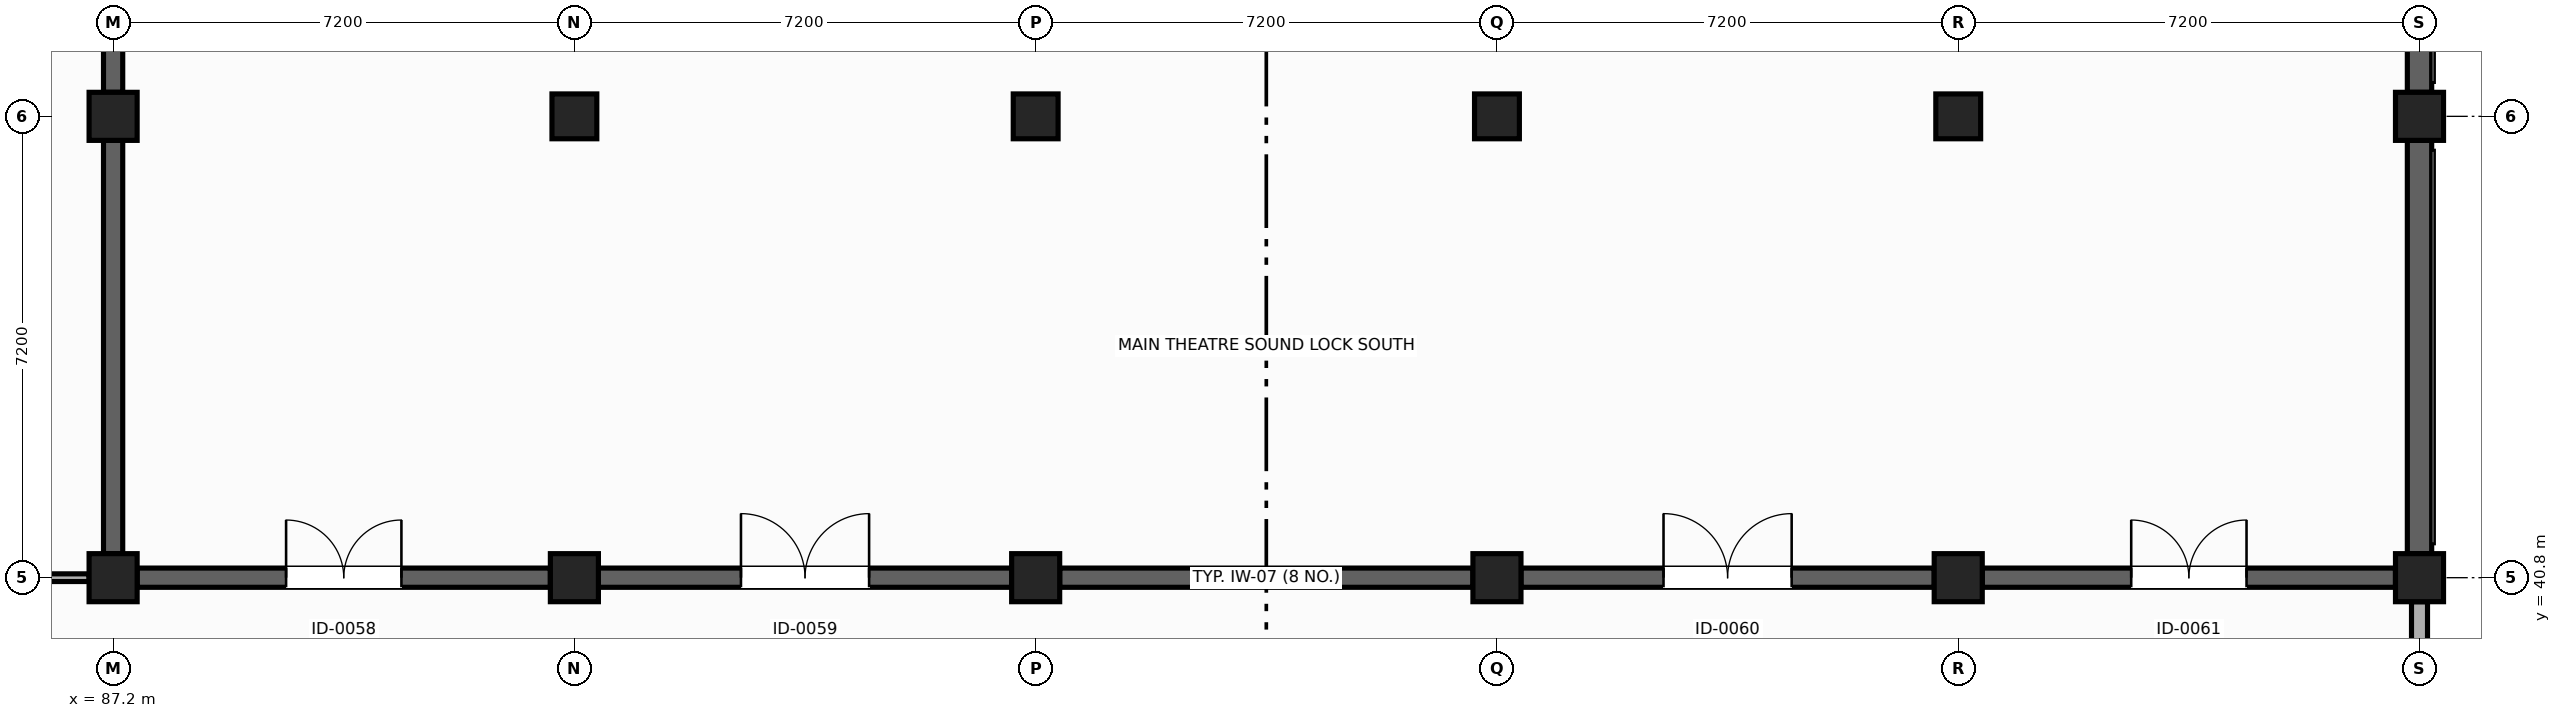
"""IFC4 building model, lengths in metres.
Left out: names, types, materials, properties, quantities, classifications, styles, units other than length and angle.
Written with IfcOpenShell. Run it as: python <this file> out.ifc"""

import sys

from ifc_helpers import new_model, si_unit, direction, frame, frame_2d, origin, origin_2d, place, context, subcontext, project, spatial, rectangle, extrude, element, fill, save


model = new_model("IFC4")
c1 = context("Model", 3, precision=1e-05, world=origin(), true_north=direction((0.0, 1.0)))
c2 = subcontext(c1, "Body", "Model", "MODEL_VIEW")
j1 = project(units=[si_unit("LENGTHUNIT", "METRE"), si_unit("PLANEANGLEUNIT", "RADIAN")], contexts=[c1])
p1 = place(None, origin())
s1 = spatial("IfcSite", under=j1, at=p1, CompositionType="ELEMENT")
p2 = place(p1, origin())
s2 = spatial("IfcBuilding", under=s1, at=p2, CompositionType="ELEMENT")
p3 = place(p2, origin())
s3 = spatial("IfcBuildingStorey", under=s2, at=p3, CompositionType="ELEMENT", Elevation=0.0)
for number, where, z_axis, x_axis in (
    (1, (87.2, 40.8, 0.0), (0.0, 0.0, 1.0), (1.0, 0.0, 0.0)),
    (2, (94.4, 40.8, 0.0), (0.0, 0.0, 1.0), (0.0, 1.0, 0.0)),
    (3, (101.6, 40.8, 0.0), (0.0, 0.0, 1.0), (1.0, 0.0, 0.0)),
    (4, (108.8, 40.8, 0.0), (0.0, 0.0, 1.0), (0.0, 1.0, 0.0)),
    (5, (116.0, 40.8, 0.0), (0.0, 0.0, 1.0), (1.0, 0.0, 0.0)),
    (6, (123.2, 40.8, 0.0), (0.0, 0.0, 1.0), (1.0, 0.0, 0.0)),
    (7, (87.2, 48.0, 0.0), (0.0, 0.0, 1.0), (0.0, 1.0, 0.0)),
):
    element("IfcColumn", number, at=place(p3, frame(where, z_axis=z_axis, x_axis=x_axis)), inside=s3, PredefinedType="COLUMN", context=c2, shape_type="SweptSolid", body=[
        extrude(rectangle(XDim=0.75, YDim=0.75, at=origin_2d()), origin(), (0.0, 0.0, 1.0), 5.4),
    ])
for number, where, z_axis, x_axis in (
    (8, (94.4, 48.0, 0.0), (0.0, 0.0, 1.0), (1.0, 0.0, 0.0)),
    (9, (101.6, 48.0, 0.0), (0.0, 0.0, 1.0), (0.0, 1.0, 0.0)),
    (10, (108.8, 48.0, 0.0), (0.0, 0.0, 1.0), (1.0, 0.0, 0.0)),
    (11, (116.0, 48.0, 0.0), (0.0, 0.0, 1.0), (1.0, 0.0, 0.0)),
):
    element("IfcColumn", number, at=place(p3, frame(where, z_axis=z_axis, x_axis=x_axis)), inside=s3, PredefinedType="COLUMN", context=c2, shape_type="SweptSolid", body=[
        extrude(rectangle(XDim=0.7, YDim=0.7, at=origin_2d()), origin(), (0.0, 0.0, 1.0), 5.4),
    ])
p4 = place(p3, frame((123.2, 48.0, 0.0), z_axis=(0.0, 0.0, 1.0), x_axis=(0.0, 1.0, 0.0)))
e12 = element("IfcColumn", 12, at=p4, inside=s3, PredefinedType="COLUMN", context=c2, shape_type="SweptSolid", body=[
    extrude(rectangle(XDim=0.75, YDim=0.75, at=origin_2d()), origin(), (0.0, 0.0, 1.0), 5.4),
])
p5 = place(p3, frame((123.2, 40.425, 0.0), z_axis=(0.0, 0.0, 1.0), x_axis=(0.0, -1.0, 0.0)))
e13 = element("IfcWall", 13, at=p5, inside=s3, PredefinedType="SOLIDWALL", context=c2, shape_type="SweptSolid", body=[
    extrude(rectangle(XDim=6.475, YDim=0.25, at=frame_2d((3.238, 0.0))), origin(), (0.0, 0.0, 1.0), 4.295),
])
for number, where, z_axis, x_axis in (
    (14, (123.2, 54.825, 0.0), (0.0, 0.0, 1.0), (0.0, -1.0, 0.0)),
    (15, (123.2, 47.625, 0.0), (0.0, 0.0, 1.0), (0.0, -1.0, 0.0)),
):
    element("IfcWall", number, at=place(p3, frame(where, z_axis=z_axis, x_axis=x_axis)), inside=s3, PredefinedType="SHEAR", context=c2, shape_type="SweptSolid", body=[
        extrude(rectangle(XDim=6.45, YDim=0.38, at=frame_2d((3.225, 0.0))), origin(), (0.0, 0.0, 1.0), 5.1),
    ])
p6 = place(p3, frame((87.575, 40.8, 0.0), z_axis=(0.0, 0.0, 1.0), x_axis=(1.0, 0.0, 0.0)))
e16 = element("IfcWall", 16, at=p6, inside=s3, PredefinedType="SHEAR", context=c2, shape_type="SweptSolid", body=[
    extrude(rectangle(XDim=6.45, YDim=0.3, at=frame_2d((3.225, 0.0))), origin(), (0.0, 0.0, 1.0), 5.1),
])
p7 = place(p6, frame((2.325, 0.0, 0.0)))
e17 = element("IfcOpeningElement", 17, at=p7, cuts=e16, PredefinedType="OPENING", context=c2, shape_type="SweptSolid", body=[
    extrude(rectangle(XDim=1.8, YDim=2.3, at=frame_2d((0.9, 1.15))), frame((0.0, 0.16, 0.0), z_axis=(0.0, -1.0, 0.0), x_axis=(1.0, 0.0, 0.0)), (0.0, 0.0, 1.0), 0.32),
])
p8 = place(p3, frame((94.775, 40.8, 0.0), z_axis=(0.0, 0.0, 1.0), x_axis=(1.0, 0.0, 0.0)))
e18 = element("IfcWall", 18, at=p8, inside=s3, PredefinedType="SHEAR", context=c2, shape_type="SweptSolid", body=[
    extrude(rectangle(XDim=6.45, YDim=0.3, at=frame_2d((3.225, 0.0))), origin(), (0.0, 0.0, 1.0), 5.1),
])
p9 = place(p8, frame((2.225, 0.0, 0.0)))
e19 = element("IfcOpeningElement", 19, at=p9, cuts=e18, PredefinedType="OPENING", context=c2, shape_type="SweptSolid", body=[
    extrude(rectangle(XDim=2.0, YDim=2.35, at=frame_2d((1.0, 1.175))), frame((0.0, 0.16, 0.0), z_axis=(0.0, -1.0, 0.0), x_axis=(1.0, 0.0, 0.0)), (0.0, 0.0, 1.0), 0.32),
])
p10 = place(p3, frame((101.975, 40.8, 0.0), z_axis=(0.0, 0.0, 1.0), x_axis=(1.0, 0.0, 0.0)))
e20 = element("IfcWall", 20, at=p10, inside=s3, PredefinedType="SHEAR", context=c2, shape_type="SweptSolid", body=[
    extrude(rectangle(XDim=6.45, YDim=0.3, at=frame_2d((3.225, 0.0))), origin(), (0.0, 0.0, 1.0), 5.1),
])
p11 = place(p3, frame((109.175, 40.8, 0.0), z_axis=(0.0, 0.0, 1.0), x_axis=(1.0, 0.0, 0.0)))
e21 = element("IfcWall", 21, at=p11, inside=s3, PredefinedType="SHEAR", context=c2, shape_type="SweptSolid", body=[
    extrude(rectangle(XDim=6.45, YDim=0.3, at=frame_2d((3.225, 0.0))), origin(), (0.0, 0.0, 1.0), 5.1),
])
p12 = place(p11, frame((2.225, 0.0, 0.0)))
e22 = element("IfcOpeningElement", 22, at=p12, cuts=e21, PredefinedType="OPENING", context=c2, shape_type="SweptSolid", body=[
    extrude(rectangle(XDim=2.0, YDim=2.35, at=frame_2d((1.0, 1.175))), frame((0.0, 0.16, 0.0), z_axis=(0.0, -1.0, 0.0), x_axis=(1.0, 0.0, 0.0)), (0.0, 0.0, 1.0), 0.32),
])
p13 = place(p3, frame((116.375, 40.8, 0.0), z_axis=(0.0, 0.0, 1.0), x_axis=(1.0, 0.0, 0.0)))
e23 = element("IfcWall", 23, at=p13, inside=s3, PredefinedType="SHEAR", context=c2, shape_type="SweptSolid", body=[
    extrude(rectangle(XDim=6.45, YDim=0.3, at=frame_2d((3.225, 0.0))), origin(), (0.0, 0.0, 1.0), 5.1),
])
p14 = place(p13, frame((2.325, 0.0, 0.0)))
e24 = element("IfcOpeningElement", 24, at=p14, cuts=e23, PredefinedType="OPENING", context=c2, shape_type="SweptSolid", body=[
    extrude(rectangle(XDim=1.8, YDim=2.3, at=frame_2d((0.9, 1.15))), frame((0.0, 0.16, 0.0), z_axis=(0.0, -1.0, 0.0), x_axis=(1.0, 0.0, 0.0)), (0.0, 0.0, 1.0), 0.32),
])
p15 = place(p3, frame((87.2, 41.175, 0.0), z_axis=(0.0, 0.0, 1.0), x_axis=(0.0, 1.0, 0.0)))
e25 = element("IfcWall", 25, at=p15, inside=s3, PredefinedType="SHEAR", context=c2, shape_type="SweptSolid", body=[
    extrude(rectangle(XDim=6.45, YDim=0.3, at=frame_2d((3.225, 0.0))), origin(), (0.0, 0.0, 1.0), 5.1),
])
p16 = place(p3, frame((87.2, 48.375, 0.0), z_axis=(0.0, 0.0, 1.0), x_axis=(0.0, 1.0, 0.0)))
e26 = element("IfcWall", 26, at=p16, inside=s3, PredefinedType="SHEAR", context=c2, shape_type="SweptSolid", body=[
    extrude(rectangle(XDim=6.45, YDim=0.3, at=frame_2d((3.225, 0.0))), origin(), (0.0, 0.0, 1.0), 5.1),
])
p17 = place(p16, frame((2.275, 0.0, 0.0)))
e27 = element("IfcOpeningElement", 27, at=p17, cuts=e26, PredefinedType="OPENING", context=c2, shape_type="SweptSolid", body=[
    extrude(rectangle(XDim=1.9, YDim=2.35, at=frame_2d((0.95, 1.175))), frame((0.0, 0.16, 0.0), z_axis=(0.0, -1.0, 0.0), x_axis=(1.0, 0.0, 0.0)), (0.0, 0.0, 1.0), 0.32),
])
p18 = place(p3, frame((80.662, 40.8, 0.0), z_axis=(0.0, 0.0, 1.0), x_axis=(1.0, 0.0, 0.0)))
e28 = element("IfcWall", 28, at=p18, inside=s3, PredefinedType="PARTITIONING", context=c2, shape_type="SweptSolid", body=[
    extrude(rectangle(XDim=6.163, YDim=0.12, at=frame_2d((3.082, 0.0))), origin(), (0.0, 0.0, 1.0), 4.295),
])
p19 = place(p7, origin())
e29 = element("IfcDoor", 29, at=p19, inside=s3, OperationType="DOUBLE_DOOR_SINGLE_SWING", PredefinedType="DOOR", context=c2, shape_type="SweptSolid", body=[
    extrude(rectangle(XDim=1.8, YDim=2.3, at=frame_2d((0.9, 1.15))), frame((0.0, 0.025, 0.0), z_axis=(0.0, -1.0, 0.0), x_axis=(1.0, 0.0, 0.0)), (0.0, 0.0, 1.0), 0.05),
])
fill(e17, e29)
p20 = place(p9, origin())
e30 = element("IfcDoor", 30, at=p20, inside=s3, OperationType="DOUBLE_DOOR_SINGLE_SWING", PredefinedType="DOOR", context=c2, shape_type="SweptSolid", body=[
    extrude(rectangle(XDim=2.0, YDim=2.35, at=frame_2d((1.0, 1.175))), frame((0.0, 0.025, 0.0), z_axis=(0.0, -1.0, 0.0), x_axis=(1.0, 0.0, 0.0)), (0.0, 0.0, 1.0), 0.05),
])
fill(e19, e30)
p21 = place(p12, origin())
e31 = element("IfcDoor", 31, at=p21, inside=s3, OperationType="DOUBLE_DOOR_SINGLE_SWING", PredefinedType="DOOR", context=c2, shape_type="SweptSolid", body=[
    extrude(rectangle(XDim=2.0, YDim=2.35, at=frame_2d((1.0, 1.175))), frame((0.0, 0.025, 0.0), z_axis=(0.0, -1.0, 0.0), x_axis=(1.0, 0.0, 0.0)), (0.0, 0.0, 1.0), 0.05),
])
fill(e22, e31)
p22 = place(p14, origin())
e32 = element("IfcDoor", 32, at=p22, inside=s3, OperationType="DOUBLE_DOOR_SINGLE_SWING", PredefinedType="DOOR", context=c2, shape_type="SweptSolid", body=[
    extrude(rectangle(XDim=1.8, YDim=2.3, at=frame_2d((0.9, 1.15))), frame((0.0, 0.025, 0.0), z_axis=(0.0, -1.0, 0.0), x_axis=(1.0, 0.0, 0.0)), (0.0, 0.0, 1.0), 0.05),
])
fill(e24, e32)
save(model, sys.argv[1])
